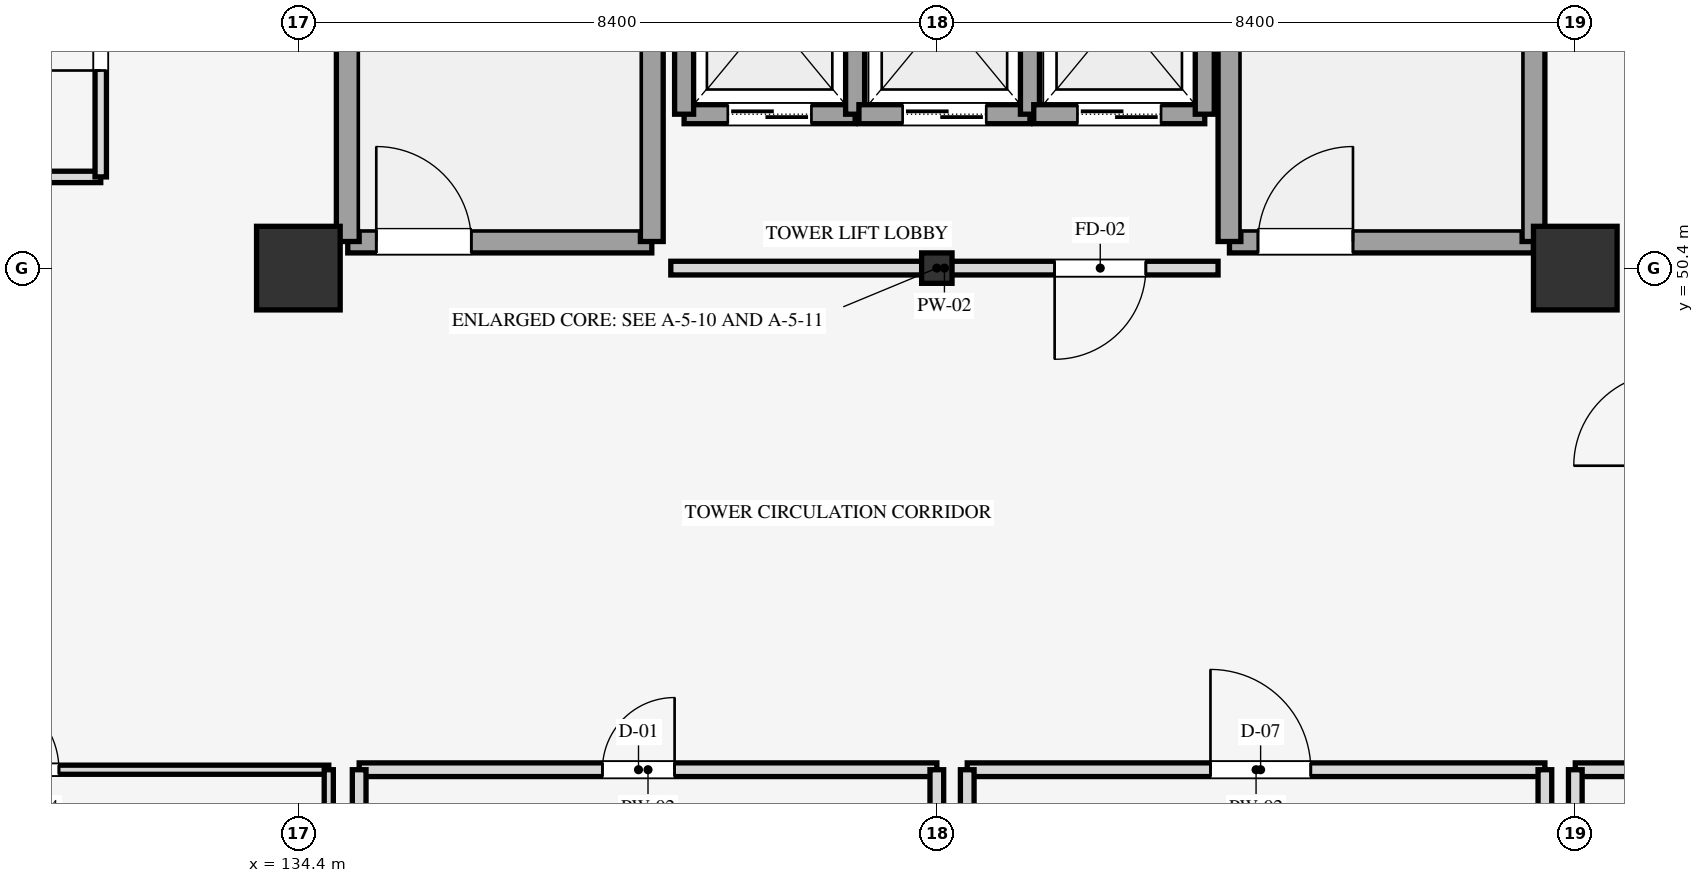
"""IFC4 building model, lengths in metres.
Left out: names, types, materials, properties, quantities, classifications, styles, units other than length and angle.
Written with IfcOpenShell. Run it as: python <this file> out.ifc"""

import sys

from ifc_helpers import new_model, si_unit, direction, frame, frame_2d, origin, origin_2d, place, context, subcontext, project, spatial, rectangle, i_section, extrude, element, fill, save


model = new_model("IFC4")
c1 = context("Model", 3, precision=1e-05, world=origin(), true_north=direction((0.0, 1.0)))
c2 = subcontext(c1, "Body", "Model", "MODEL_VIEW")
j1 = project(units=[si_unit("LENGTHUNIT", "METRE"), si_unit("PLANEANGLEUNIT", "RADIAN")], contexts=[c1])
p1 = place(None, origin())
s1 = spatial("IfcSite", under=j1, at=p1, CompositionType="ELEMENT")
p2 = place(p1, origin())
s2 = spatial("IfcBuilding", under=s1, at=p2, CompositionType="ELEMENT")
p3 = place(p2, frame((0.0, 0.0, 36.3)))
s3 = spatial("IfcBuildingStorey", under=s2, at=p3, CompositionType="ELEMENT", Elevation=36.3)
p4 = place(p3, frame((134.4, 50.4, 0.0), z_axis=(0.0, 0.0, 1.0), x_axis=(1.0, 0.0, 0.0)))
e1 = element("IfcColumn", 1, at=p4, inside=s3, PredefinedType="COLUMN", context=c2, shape_type="SweptSolid", body=[
    extrude(rectangle(XDim=1.1, YDim=1.1, at=origin_2d()), origin(), (0.0, 0.0, 1.0), 4.2),
])
p5 = place(p3, frame((142.8, 50.4, 0.0), z_axis=(0.0, 0.0, 1.0), x_axis=(1.0, 0.0, 0.0)))
e2 = element("IfcColumn", 2, at=p5, inside=s3, PredefinedType="COLUMN", context=c2, shape_type="SweptSolid", body=[
    extrude(i_section(OverallWidth=0.4, OverallDepth=0.4, WebThickness=0.013, FlangeThickness=0.021, FilletRadius=0.022, at=origin_2d()), origin(), (0.0, 0.0, 1.0), 4.2),
])
p6 = place(p3, frame((151.2, 50.4, 0.0), z_axis=(0.0, 0.0, 1.0), x_axis=(1.0, 0.0, 0.0)))
e3 = element("IfcColumn", 3, at=p6, inside=s3, PredefinedType="COLUMN", context=c2, shape_type="SweptSolid", body=[
    extrude(rectangle(XDim=1.1, YDim=1.1, at=origin_2d()), origin(), (0.0, 0.0, 1.0), 4.2),
])
p7 = place(p3, frame((135.05, 50.75, 0.0), z_axis=(0.0, 0.0, 1.0), x_axis=(1.0, 0.0, 0.0)))
e4 = element("IfcWall", 4, at=p7, inside=s3, PredefinedType="SHEAR", context=c2, shape_type="SweptSolid", body=[
    extrude(rectangle(XDim=4.0, YDim=0.3, at=frame_2d((2.0, 0.0))), origin(), (0.0, 0.0, 1.0), 4.2),
])
p8 = place(p7, frame((0.375, 0.0, 0.0)))
e5 = element("IfcOpeningElement", 5, at=p8, cuts=e4, PredefinedType="OPENING", context=c2, shape_type="SweptSolid", body=[
    extrude(rectangle(XDim=1.25, YDim=2.15, at=frame_2d((0.625, 1.075))), frame((0.0, 0.16, 0.0), z_axis=(0.0, -1.0, 0.0), x_axis=(1.0, 0.0, 0.0)), (0.0, 0.0, 1.0), 0.32),
])
for number, where, z_axis, x_axis in (
    (6, (135.05, 50.75, 0.0), (0.0, 0.0, 1.0), (0.0, 1.0, 0.0)),
    (7, (139.05, 50.75, 0.0), (0.0, 0.0, 1.0), (0.0, 1.0, 0.0)),
):
    element("IfcWall", number, at=place(p3, frame(where, z_axis=z_axis, x_axis=x_axis)), inside=s3, PredefinedType="SHEAR", context=c2, shape_type="SweptSolid", body=[
        extrude(rectangle(XDim=14.3, YDim=0.3, at=frame_2d((7.15, 0.0))), origin(), (0.0, 0.0, 1.0), 4.2),
    ])
p9 = place(p3, frame((137.25, 52.4, 0.0), z_axis=(0.0, 0.0, 1.0), x_axis=(0.0, 1.0, 0.0)))
e8 = element("IfcWall", 8, at=p9, inside=s3, PredefinedType="SHEAR", context=c2, shape_type="SweptSolid", body=[
    extrude(rectangle(XDim=11.0, YDim=0.2, at=frame_2d((5.5, 0.0))), origin(), (0.0, 0.0, 1.0), 4.2),
])
p10 = place(p3, frame((146.65, 50.75, 0.0), z_axis=(0.0, 0.0, 1.0), x_axis=(1.0, 0.0, 0.0)))
e9 = element("IfcWall", 9, at=p10, inside=s3, PredefinedType="SHEAR", context=c2, shape_type="SweptSolid", body=[
    extrude(rectangle(XDim=4.0, YDim=0.3, at=frame_2d((2.0, 0.0))), origin(), (0.0, 0.0, 1.0), 4.2),
])
p11 = place(p10, frame((0.375, 0.0, 0.0)))
e10 = element("IfcOpeningElement", 10, at=p11, cuts=e9, PredefinedType="OPENING", context=c2, shape_type="SweptSolid", body=[
    extrude(rectangle(XDim=1.25, YDim=2.15, at=frame_2d((0.625, 1.075))), frame((0.0, 0.16, 0.0), z_axis=(0.0, -1.0, 0.0), x_axis=(1.0, 0.0, 0.0)), (0.0, 0.0, 1.0), 0.32),
])
for number, where, z_axis, x_axis in (
    (11, (146.65, 50.75, 0.0), (0.0, 0.0, 1.0), (0.0, 1.0, 0.0)),
    (12, (150.65, 50.75, 0.0), (0.0, 0.0, 1.0), (0.0, 1.0, 0.0)),
):
    element("IfcWall", number, at=place(p3, frame(where, z_axis=z_axis, x_axis=x_axis)), inside=s3, PredefinedType="SHEAR", context=c2, shape_type="SweptSolid", body=[
        extrude(rectangle(XDim=14.3, YDim=0.3, at=frame_2d((7.15, 0.0))), origin(), (0.0, 0.0, 1.0), 4.2),
    ])
p12 = place(p3, frame((148.85, 52.4, 0.0), z_axis=(0.0, 0.0, 1.0), x_axis=(0.0, 1.0, 0.0)))
e13 = element("IfcWall", 13, at=p12, inside=s3, PredefinedType="SHEAR", context=c2, shape_type="SweptSolid", body=[
    extrude(rectangle(XDim=11.0, YDim=0.2, at=frame_2d((5.5, 0.0))), origin(), (0.0, 0.0, 1.0), 4.2),
])
p13 = place(p3, frame((139.475, 52.425, 0.0), z_axis=(0.0, 0.0, 1.0), x_axis=(1.0, 0.0, 0.0)))
e14 = element("IfcWall", 14, at=p13, inside=s3, PredefinedType="SHEAR", context=c2, shape_type="SweptSolid", body=[
    extrude(rectangle(XDim=2.25, YDim=0.25, at=frame_2d((1.125, 0.0))), origin(), (0.0, 0.0, 1.0), 3.96),
])
p14 = place(p13, frame((0.575, 0.0, 0.0)))
e15 = element("IfcOpeningElement", 15, at=p14, cuts=e14, PredefinedType="OPENING", context=c2, shape_type="SweptSolid", body=[
    extrude(rectangle(XDim=1.1, YDim=2.15, at=frame_2d((0.55, 1.075))), frame((0.0, 0.135, 0.0), z_axis=(0.0, -1.0, 0.0), x_axis=(1.0, 0.0, 0.0)), (0.0, 0.0, 1.0), 0.27),
])
for number, where, z_axis, x_axis in (
    (16, (139.475, 52.425, 0.0), (0.0, 0.0, 1.0), (0.0, 1.0, 0.0)),
    (17, (141.725, 52.425, 0.0), (0.0, 0.0, 1.0), (0.0, 1.0, 0.0)),
):
    element("IfcWall", number, at=place(p3, frame(where, z_axis=z_axis, x_axis=x_axis)), inside=s3, PredefinedType="SHEAR", context=c2, shape_type="SweptSolid", body=[
        extrude(rectangle(XDim=2.65, YDim=0.25, at=frame_2d((1.325, 0.0))), origin(), (0.0, 0.0, 1.0), 3.96),
    ])
p15 = place(p3, frame((141.775, 52.425, 0.0), z_axis=(0.0, 0.0, 1.0), x_axis=(1.0, 0.0, 0.0)))
e18 = element("IfcWall", 18, at=p15, inside=s3, PredefinedType="SHEAR", context=c2, shape_type="SweptSolid", body=[
    extrude(rectangle(XDim=2.25, YDim=0.25, at=frame_2d((1.125, 0.0))), origin(), (0.0, 0.0, 1.0), 3.96),
])
p16 = place(p15, frame((0.575, 0.0, 0.0)))
e19 = element("IfcOpeningElement", 19, at=p16, cuts=e18, PredefinedType="OPENING", context=c2, shape_type="SweptSolid", body=[
    extrude(rectangle(XDim=1.1, YDim=2.15, at=frame_2d((0.55, 1.075))), frame((0.0, 0.135, 0.0), z_axis=(0.0, -1.0, 0.0), x_axis=(1.0, 0.0, 0.0)), (0.0, 0.0, 1.0), 0.27),
])
p17 = place(p3, frame((144.025, 52.425, 0.0), z_axis=(0.0, 0.0, 1.0), x_axis=(0.0, 1.0, 0.0)))
e20 = element("IfcWall", 20, at=p17, inside=s3, PredefinedType="SHEAR", context=c2, shape_type="SweptSolid", body=[
    extrude(rectangle(XDim=2.65, YDim=0.25, at=frame_2d((1.325, 0.0))), origin(), (0.0, 0.0, 1.0), 3.96),
])
p18 = place(p3, frame((144.075, 52.425, 0.0), z_axis=(0.0, 0.0, 1.0), x_axis=(1.0, 0.0, 0.0)))
e21 = element("IfcWall", 21, at=p18, inside=s3, PredefinedType="SHEAR", context=c2, shape_type="SweptSolid", body=[
    extrude(rectangle(XDim=2.25, YDim=0.25, at=frame_2d((1.125, 0.0))), origin(), (0.0, 0.0, 1.0), 3.96),
])
p19 = place(p18, frame((0.575, 0.0, 0.0)))
e22 = element("IfcOpeningElement", 22, at=p19, cuts=e21, PredefinedType="OPENING", context=c2, shape_type="SweptSolid", body=[
    extrude(rectangle(XDim=1.1, YDim=2.15, at=frame_2d((0.55, 1.075))), frame((0.0, 0.135, 0.0), z_axis=(0.0, -1.0, 0.0), x_axis=(1.0, 0.0, 0.0)), (0.0, 0.0, 1.0), 0.27),
])
p20 = place(p3, frame((146.325, 52.425, 0.0), z_axis=(0.0, 0.0, 1.0), x_axis=(0.0, 1.0, 0.0)))
e23 = element("IfcWall", 23, at=p20, inside=s3, PredefinedType="SHEAR", context=c2, shape_type="SweptSolid", body=[
    extrude(rectangle(XDim=2.65, YDim=0.25, at=frame_2d((1.325, 0.0))), origin(), (0.0, 0.0, 1.0), 3.96),
])
p21 = place(p3, frame((139.3, 50.4, 0.0), z_axis=(0.0, 0.0, 1.0), x_axis=(1.0, 0.0, 0.0)))
e24 = element("IfcWall", 24, at=p21, inside=s3, PredefinedType="PARTITIONING", context=c2, shape_type="SweptSolid", body=[
    extrude(rectangle(XDim=7.2, YDim=0.18, at=frame_2d((3.6, 0.0))), origin(), (0.0, 0.0, 1.0), 3.24),
])
p22 = place(p21, frame((5.05, 0.0, 0.0)))
e25 = element("IfcOpeningElement", 25, at=p22, cuts=e24, PredefinedType="OPENING", context=c2, shape_type="SweptSolid", body=[
    extrude(rectangle(XDim=1.2, YDim=2.15, at=frame_2d((0.6, 1.075))), frame((0.0, 0.1, 0.0), z_axis=(0.0, -1.0, 0.0), x_axis=(1.0, 0.0, 0.0)), (0.0, 0.0, 1.0), 0.2),
])
p23 = place(p3, frame((127.75, 51.6, 0.0), z_axis=(0.0, 0.0, 1.0), x_axis=(1.0, 0.0, 0.0)))
e26 = element("IfcWall", 26, at=p23, inside=s3, PredefinedType="PARTITIONING", context=c2, shape_type="SweptSolid", body=[
    extrude(rectangle(XDim=4.05, YDim=0.15, at=frame_2d((2.025, 0.0))), origin(), (0.0, 0.0, 1.0), 3.24),
])
p24 = place(p3, frame((131.8, 51.6, 0.0), z_axis=(0.0, 0.0, 1.0), x_axis=(0.0, 1.0, 0.0)))
e27 = element("IfcWall", 27, at=p24, inside=s3, PredefinedType="PARTITIONING", context=c2, shape_type="SweptSolid", body=[
    extrude(rectangle(XDim=4.0, YDim=0.15, at=frame_2d((2.0, 0.0))), origin(), (0.0, 0.0, 1.0), 3.24),
])
p25 = place(p24, frame((1.4, 0.0, 0.0)))
e28 = element("IfcOpeningElement", 28, at=p25, cuts=e27, PredefinedType="OPENING", context=c2, shape_type="SweptSolid", body=[
    extrude(rectangle(XDim=1.42, YDim=2.18, at=frame_2d((0.71, 1.09))), frame((0.0, 0.085, 0.0), z_axis=(0.0, -1.0, 0.0), x_axis=(1.0, 0.0, 0.0)), (0.0, 0.0, 1.0), 0.17),
])
p26 = place(p3, frame((127.0, 43.8, 0.0), z_axis=(0.0, 0.0, 1.0), x_axis=(1.0, 0.0, 0.0)))
e29 = element("IfcWall", 29, at=p26, inside=s3, PredefinedType="PARTITIONING", context=c2, shape_type="SweptSolid", body=[
    extrude(rectangle(XDim=7.8, YDim=0.12, at=frame_2d((3.9, 0.0))), origin(), (0.0, 0.0, 1.0), 3.24),
])
p27 = place(p26, frame((3.2, 0.0, 0.0)))
e30 = element("IfcOpeningElement", 30, at=p27, cuts=e29, PredefinedType="OPENING", context=c2, shape_type="SweptSolid", body=[
    extrude(rectangle(XDim=1.05, YDim=2.16, at=frame_2d((0.525, 1.08))), frame((0.0, 0.07, 0.0), z_axis=(0.0, -1.0, 0.0), x_axis=(1.0, 0.0, 0.0)), (0.0, 0.0, 1.0), 0.14),
])
p28 = place(p3, frame((134.8, 34.4, 0.0), z_axis=(0.0, 0.0, 1.0), x_axis=(0.0, 1.0, 0.0)))
e31 = element("IfcWall", 31, at=p28, inside=s3, PredefinedType="PARTITIONING", context=c2, shape_type="SweptSolid", body=[
    extrude(rectangle(XDim=9.4, YDim=0.12, at=frame_2d((4.7, 0.0))), origin(), (0.0, 0.0, 1.0), 3.24),
])
p29 = place(p3, frame((135.2, 43.8, 0.0), z_axis=(0.0, 0.0, 1.0), x_axis=(1.0, 0.0, 0.0)))
e32 = element("IfcWall", 32, at=p29, inside=s3, PredefinedType="PARTITIONING", context=c2, shape_type="SweptSolid", body=[
    extrude(rectangle(XDim=7.6, YDim=0.18, at=frame_2d((3.8, 0.0))), origin(), (0.0, 0.0, 1.0), 3.24),
])
p30 = place(p29, frame((3.2, 0.0, 0.0)))
e33 = element("IfcOpeningElement", 33, at=p30, cuts=e32, PredefinedType="OPENING", context=c2, shape_type="SweptSolid", body=[
    extrude(rectangle(XDim=0.95, YDim=2.1, at=frame_2d((0.475, 1.05))), frame((0.0, 0.1, 0.0), z_axis=(0.0, -1.0, 0.0), x_axis=(1.0, 0.0, 0.0)), (0.0, 0.0, 1.0), 0.2),
])
for number, where, z_axis, x_axis in (
    (34, (135.2, 34.4, 0.0), (0.0, 0.0, 1.0), (0.0, 1.0, 0.0)),
    (35, (142.8, 34.4, 0.0), (0.0, 0.0, 1.0), (0.0, 1.0, 0.0)),
):
    element("IfcWall", number, at=place(p3, frame(where, z_axis=z_axis, x_axis=x_axis)), inside=s3, PredefinedType="PARTITIONING", context=c2, shape_type="SweptSolid", body=[
        extrude(rectangle(XDim=9.4, YDim=0.18, at=frame_2d((4.7, 0.0))), origin(), (0.0, 0.0, 1.0), 3.24),
    ])
p31 = place(p3, frame((143.2, 43.8, 0.0), z_axis=(0.0, 0.0, 1.0), x_axis=(1.0, 0.0, 0.0)))
e36 = element("IfcWall", 36, at=p31, inside=s3, PredefinedType="PARTITIONING", context=c2, shape_type="SweptSolid", body=[
    extrude(rectangle(XDim=7.6, YDim=0.18, at=frame_2d((3.8, 0.0))), origin(), (0.0, 0.0, 1.0), 3.24),
])
p32 = place(p31, frame((3.2, 0.0, 0.0)))
e37 = element("IfcOpeningElement", 37, at=p32, cuts=e36, PredefinedType="OPENING", context=c2, shape_type="SweptSolid", body=[
    extrude(rectangle(XDim=1.32, YDim=2.18, at=frame_2d((0.66, 1.09))), frame((0.0, 0.1, 0.0), z_axis=(0.0, -1.0, 0.0), x_axis=(1.0, 0.0, 0.0)), (0.0, 0.0, 1.0), 0.2),
])
for number, where, z_axis, x_axis in (
    (38, (143.2, 34.4, 0.0), (0.0, 0.0, 1.0), (0.0, 1.0, 0.0)),
    (39, (150.8, 34.4, 0.0), (0.0, 0.0, 1.0), (0.0, 1.0, 0.0)),
):
    element("IfcWall", number, at=place(p3, frame(where, z_axis=z_axis, x_axis=x_axis)), inside=s3, PredefinedType="PARTITIONING", context=c2, shape_type="SweptSolid", body=[
        extrude(rectangle(XDim=9.4, YDim=0.18, at=frame_2d((4.7, 0.0))), origin(), (0.0, 0.0, 1.0), 3.24),
    ])
p33 = place(p3, frame((151.2, 43.8, 0.0), z_axis=(0.0, 0.0, 1.0), x_axis=(1.0, 0.0, 0.0)))
e40 = element("IfcWall", 40, at=p33, inside=s3, PredefinedType="PARTITIONING", context=c2, shape_type="SweptSolid", body=[
    extrude(rectangle(XDim=7.8, YDim=0.18, at=frame_2d((3.9, 0.0))), origin(), (0.0, 0.0, 1.0), 3.24),
])
p34 = place(p33, frame((3.2, 0.0, 0.0)))
e41 = element("IfcOpeningElement", 41, at=p34, cuts=e40, PredefinedType="OPENING", context=c2, shape_type="SweptSolid", body=[
    extrude(rectangle(XDim=0.95, YDim=2.1, at=frame_2d((0.475, 1.05))), frame((0.0, 0.1, 0.0), z_axis=(0.0, -1.0, 0.0), x_axis=(1.0, 0.0, 0.0)), (0.0, 0.0, 1.0), 0.2),
])
p35 = place(p3, frame((151.2, 34.4, 0.0), z_axis=(0.0, 0.0, 1.0), x_axis=(0.0, 1.0, 0.0)))
e42 = element("IfcWall", 42, at=p35, inside=s3, PredefinedType="PARTITIONING", context=c2, shape_type="SweptSolid", body=[
    extrude(rectangle(XDim=9.4, YDim=0.18, at=frame_2d((4.7, 0.0))), origin(), (0.0, 0.0, 1.0), 3.24),
])
p36 = place(p8, origin())
e43 = element("IfcDoor", 43, at=p36, inside=s3, OperationType="SINGLE_SWING_LEFT", PredefinedType="DOOR", context=c2, shape_type="SweptSolid", body=[
    extrude(rectangle(XDim=1.25, YDim=2.15, at=frame_2d((0.625, 1.075))), frame((0.0, 0.025, 0.0), z_axis=(0.0, -1.0, 0.0), x_axis=(1.0, 0.0, 0.0)), (0.0, 0.0, 1.0), 0.05),
])
fill(e5, e43)
p37 = place(p11, origin())
e44 = element("IfcDoor", 44, at=p37, inside=s3, OperationType="SINGLE_SWING_RIGHT", PredefinedType="DOOR", context=c2, shape_type="SweptSolid", body=[
    extrude(rectangle(XDim=1.25, YDim=2.15, at=frame_2d((0.625, 1.075))), frame((0.0, 0.025, 0.0), z_axis=(0.0, -1.0, 0.0), x_axis=(1.0, 0.0, 0.0)), (0.0, 0.0, 1.0), 0.05),
])
fill(e10, e44)
p38 = place(p14, origin())
e45 = element("IfcDoor", 45, at=p38, inside=s3, OperationType="DOUBLE_DOOR_SLIDING", PredefinedType="DOOR", context=c2, shape_type="SweptSolid", body=[
    extrude(rectangle(XDim=1.1, YDim=2.15, at=frame_2d((0.55, 1.075))), frame((0.0, 0.025, 0.0), z_axis=(0.0, -1.0, 0.0), x_axis=(1.0, 0.0, 0.0)), (0.0, 0.0, 1.0), 0.05),
])
fill(e15, e45)
p39 = place(p16, origin())
e46 = element("IfcDoor", 46, at=p39, inside=s3, OperationType="DOUBLE_DOOR_SLIDING", PredefinedType="DOOR", context=c2, shape_type="SweptSolid", body=[
    extrude(rectangle(XDim=1.1, YDim=2.15, at=frame_2d((0.55, 1.075))), frame((0.0, 0.025, 0.0), z_axis=(0.0, -1.0, 0.0), x_axis=(1.0, 0.0, 0.0)), (0.0, 0.0, 1.0), 0.05),
])
fill(e19, e46)
p40 = place(p19, origin())
e47 = element("IfcDoor", 47, at=p40, inside=s3, OperationType="DOUBLE_DOOR_SLIDING", PredefinedType="DOOR", context=c2, shape_type="SweptSolid", body=[
    extrude(rectangle(XDim=1.1, YDim=2.15, at=frame_2d((0.55, 1.075))), frame((0.0, 0.025, 0.0), z_axis=(0.0, -1.0, 0.0), x_axis=(1.0, 0.0, 0.0)), (0.0, 0.0, 1.0), 0.05),
])
fill(e22, e47)
p41 = place(p22, frame((1.2, 0.0, 0.0), z_axis=(0.0, 0.0, 1.0), x_axis=(-1.0, 0.0, 0.0)))
e48 = element("IfcDoor", 48, at=p41, inside=s3, OperationType="SINGLE_SWING_RIGHT", PredefinedType="DOOR", context=c2, shape_type="SweptSolid", body=[
    extrude(rectangle(XDim=1.2, YDim=2.15, at=frame_2d((0.6, 1.075))), frame((0.0, 0.025, 0.0), z_axis=(0.0, -1.0, 0.0), x_axis=(1.0, 0.0, 0.0)), (0.0, 0.0, 1.0), 0.05),
])
fill(e25, e48)
p42 = place(p25, origin())
e49 = element("IfcDoor", 49, at=p42, inside=s3, OperationType="DOUBLE_DOOR_SINGLE_SWING", PredefinedType="DOOR", context=c2, shape_type="SweptSolid", body=[
    extrude(rectangle(XDim=1.42, YDim=2.18, at=frame_2d((0.71, 1.09))), frame((0.0, 0.025, 0.0), z_axis=(0.0, -1.0, 0.0), x_axis=(1.0, 0.0, 0.0)), (0.0, 0.0, 1.0), 0.05),
])
fill(e28, e49)
p43 = place(p27, origin())
e50 = element("IfcDoor", 50, at=p43, inside=s3, OperationType="SINGLE_SWING_LEFT", PredefinedType="DOOR", context=c2, shape_type="SweptSolid", body=[
    extrude(rectangle(XDim=1.05, YDim=2.16, at=frame_2d((0.525, 1.08))), frame((0.0, 0.025, 0.0), z_axis=(0.0, -1.0, 0.0), x_axis=(1.0, 0.0, 0.0)), (0.0, 0.0, 1.0), 0.05),
])
fill(e30, e50)
p44 = place(p30, origin())
e51 = element("IfcDoor", 51, at=p44, inside=s3, OperationType="SINGLE_SWING_RIGHT", PredefinedType="DOOR", context=c2, shape_type="SweptSolid", body=[
    extrude(rectangle(XDim=0.95, YDim=2.1, at=frame_2d((0.475, 1.05))), frame((0.0, 0.025, 0.0), z_axis=(0.0, -1.0, 0.0), x_axis=(1.0, 0.0, 0.0)), (0.0, 0.0, 1.0), 0.05),
])
fill(e33, e51)
p45 = place(p32, origin())
e52 = element("IfcDoor", 52, at=p45, inside=s3, OperationType="SINGLE_SWING_LEFT", PredefinedType="DOOR", context=c2, shape_type="SweptSolid", body=[
    extrude(rectangle(XDim=1.32, YDim=2.18, at=frame_2d((0.66, 1.09))), frame((0.0, 0.025, 0.0), z_axis=(0.0, -1.0, 0.0), x_axis=(1.0, 0.0, 0.0)), (0.0, 0.0, 1.0), 0.05),
])
fill(e37, e52)
save(model, sys.argv[1])
